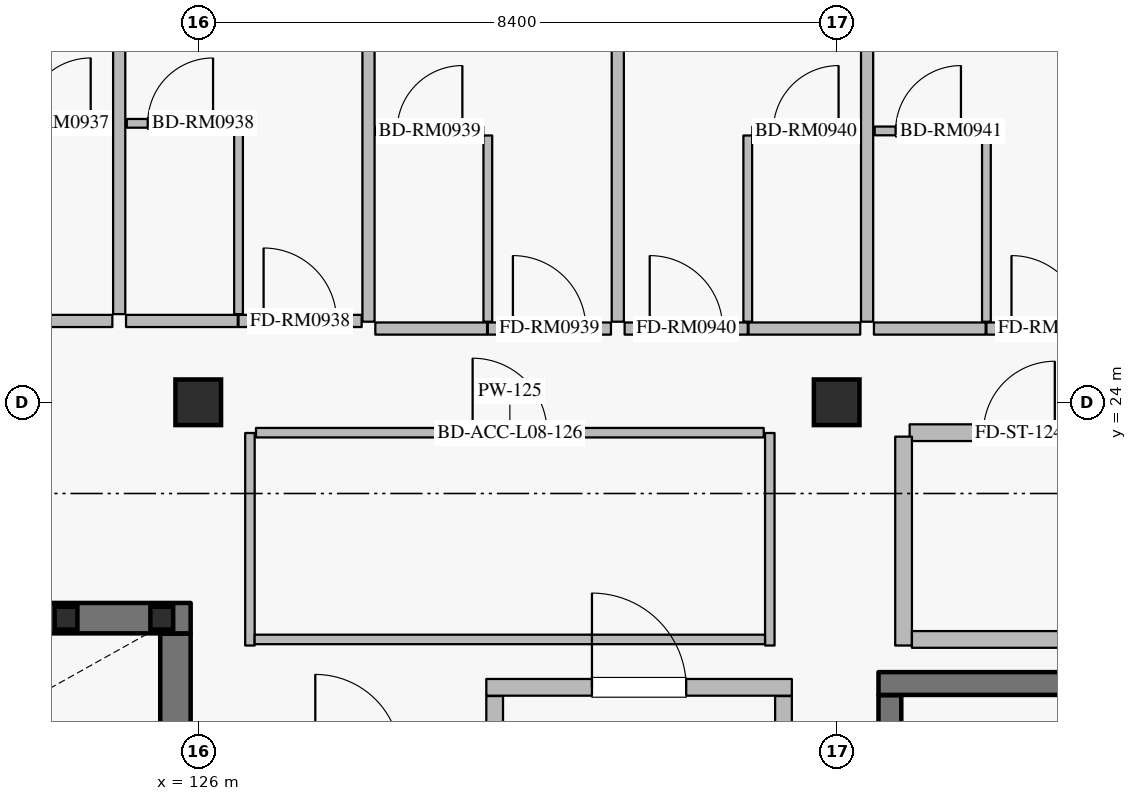
"""IFC4 building model, lengths in metres.
Left out: names, types, materials, properties, quantities, classifications, styles, units other than length and angle.
Written with IfcOpenShell. Run it as: python <this file> out.ifc"""

import sys

from ifc_helpers import new_model, si_unit, direction, frame, frame_2d, origin, origin_2d, place, context, subcontext, project, spatial, rectangle, hollow_rectangle, extrude, element, fill, save


model = new_model("IFC4")
c1 = context("Model", 3, precision=1e-05, world=origin(), true_north=direction((0.0, 1.0)))
c2 = subcontext(c1, "Body", "Model", "MODEL_VIEW")
j1 = project(units=[si_unit("LENGTHUNIT", "METRE"), si_unit("PLANEANGLEUNIT", "RADIAN")], contexts=[c1])
p1 = place(None, origin())
s1 = spatial("IfcSite", under=j1, at=p1, CompositionType="ELEMENT")
p2 = place(p1, origin())
s2 = spatial("IfcBuilding", under=s1, at=p2, CompositionType="ELEMENT")
p3 = place(p2, frame((0.0, 0.0, 36.0)))
s3 = spatial("IfcBuildingStorey", under=s2, at=p3, CompositionType="ELEMENT", Elevation=36.0)
for number, where, z_axis, x_axis in (
    (1, (126.0, 24.0, 0.0), (0.0, 0.0, 1.0), (1.0, 0.0, 0.0)),
    (2, (134.4, 24.0, 0.0), (0.0, 0.0, 1.0), (1.0, 0.0, 0.0)),
):
    element("IfcColumn", number, at=place(p3, frame(where, z_axis=z_axis, x_axis=x_axis)), inside=s3, PredefinedType="COLUMN", context=c2, shape_type="SweptSolid", body=[
        extrude(rectangle(XDim=0.6, YDim=0.6, at=origin_2d()), origin(), (0.0, 0.0, 1.0), 3.6),
    ])
p4 = place(p3, frame((138.05, 20.3, 0.0), z_axis=(0.0, 0.0, 1.0), x_axis=(-1.0, 0.0, 0.0)))
e3 = element("IfcWall", 3, at=p4, inside=s3, PredefinedType="SHEAR", context=c2, shape_type="SweptSolid", body=[
    extrude(rectangle(XDim=3.1, YDim=0.3, at=frame_2d((1.55, 0.0))), origin(), (0.0, 0.0, 1.0), 3.365),
])
p5 = place(p3, frame((135.1, 20.145, 0.0), z_axis=(0.0, 0.0, 1.0), x_axis=(0.0, -1.0, 0.0)))
e4 = element("IfcWall", 4, at=p5, inside=s3, PredefinedType="SHEAR", context=c2, shape_type="SweptSolid", body=[
    extrude(rectangle(XDim=2.59, YDim=0.3, at=frame_2d((1.295, 0.0))), origin(), (0.0, 0.0, 1.0), 3.365),
])
p6 = place(p3, frame((129.9, 19.415, 0.0), z_axis=(0.0, 0.0, 1.0), x_axis=(0.0, 1.0, 0.0)))
e5 = element("IfcWall", 5, at=p6, inside=s3, PredefinedType="PARTITIONING", context=c2, shape_type="SweptSolid", body=[
    extrude(rectangle(XDim=0.72, YDim=0.22, at=frame_2d((0.36, 0.0))), origin(), (0.0, 0.0, 1.0), 3.365),
])
p7 = place(p3, frame((133.7, 16.605, 0.0), z_axis=(0.0, 0.0, 1.0), x_axis=(0.0, 1.0, 0.0)))
e6 = element("IfcWall", 6, at=p7, inside=s3, PredefinedType="PARTITIONING", context=c2, shape_type="SweptSolid", body=[
    extrude(rectangle(XDim=3.53, YDim=0.22, at=frame_2d((1.765, 0.0))), origin(), (0.0, 0.0, 1.0), 3.365),
])
p8 = place(p3, frame((129.79, 20.25, 0.0), z_axis=(0.0, 0.0, 1.0), x_axis=(1.0, 0.0, 0.0)))
e7 = element("IfcWall", 7, at=p8, inside=s3, PredefinedType="PARTITIONING", context=c2, shape_type="SweptSolid", body=[
    extrude(rectangle(XDim=4.02, YDim=0.22, at=frame_2d((2.01, 0.0))), origin(), (0.0, 0.0, 1.0), 3.365),
])
p9 = place(p8, frame((1.39, 0.0, 0.0)))
e8 = element("IfcOpeningElement", 8, at=p9, cuts=e7, PredefinedType="OPENING", context=c2, shape_type="SweptSolid", body=[
    extrude(rectangle(XDim=1.24, YDim=2.2, at=frame_2d((0.62, 1.1))), frame((0.0, 0.12, 0.0), z_axis=(0.0, -1.0, 0.0), x_axis=(1.0, 0.0, 0.0)), (0.0, 0.0, 1.0), 0.24),
])
p10 = place(p3, frame((125.7, 17.005, 0.0), z_axis=(0.0, 0.0, 1.0), x_axis=(0.0, 1.0, 0.0)))
e9 = element("IfcWall", 9, at=p10, inside=s3, PredefinedType="SHEAR", context=c2, shape_type="SweptSolid", body=[
    extrude(rectangle(XDim=3.95, YDim=0.4, at=frame_2d((1.975, 0.0))), origin(), (0.0, 0.0, 1.0), 3.365),
])
p11 = place(p3, frame((117.75, 21.16, 0.0), z_axis=(0.0, 0.0, 1.0), x_axis=(1.0, 0.0, 0.0)))
e10 = element("IfcWall", 10, at=p11, inside=s3, PredefinedType="SHEAR", context=c2, shape_type="SweptSolid", body=[
    extrude(rectangle(XDim=8.15, YDim=0.4, at=frame_2d((4.075, 0.0))), origin(), (0.0, 0.0, 1.0), 3.365),
])
p12 = place(p11, frame((0.38, 0.0, 0.0)))
e11 = element("IfcOpeningElement", 11, at=p12, cuts=e10, PredefinedType="OPENING", context=c2, shape_type="SweptSolid", body=[
    extrude(rectangle(XDim=1.16, YDim=2.2, at=frame_2d((0.58, 1.1))), frame((0.0, 0.21, 0.0), z_axis=(0.0, -1.0, 0.0), x_axis=(1.0, 0.0, 0.0)), (0.0, 0.0, 1.0), 0.42),
])
for number, where, z_axis, x_axis in (
    (12, (124.26, 21.16, -1.8), (0.0, 0.0, 1.0), (1.0, 0.0, 0.0)),
    (13, (125.52, 21.16, -1.8), (0.0, 0.0, 1.0), (1.0, 0.0, 0.0)),
):
    element("IfcColumn", number, at=place(p3, frame(where, z_axis=z_axis, x_axis=x_axis)), inside=s3, PredefinedType="COLUMN", context=c2, shape_type="SweptSolid", body=[
        extrude(hollow_rectangle(XDim=0.3, YDim=0.3, WallThickness=0.012, at=origin_2d()), origin(), (0.0, 0.0, 1.0), 3.42),
    ])
p13 = place(p3, frame((123.4, 25.07, 0.0), z_axis=(0.0, 0.0, 1.0), x_axis=(1.0, 0.0, 0.0)))
e14 = element("IfcWall", 14, at=p13, inside=s3, PredefinedType="PARTITIONING", context=c2, shape_type="SweptSolid", body=[
    extrude(rectangle(XDim=1.47, YDim=0.16, at=frame_2d((0.735, 0.0))), origin(), (0.0, 0.0, 1.0), 3.365),
])
p14 = place(p3, frame((123.45, 27.67, 0.0), z_axis=(0.0, 0.0, 1.0), x_axis=(1.0, 0.0, 0.0)))
e15 = element("IfcWall", 15, at=p14, inside=s3, PredefinedType="PARTITIONING", context=c2, shape_type="SweptSolid", body=[
    extrude(rectangle(XDim=1.41, YDim=0.115, at=frame_2d((0.705, 0.0))), origin(), (0.0, 0.0, 1.0), 3.365),
])
p15 = place(p14, frame((0.275, 0.0, 0.0)))
e16 = element("IfcOpeningElement", 16, at=p15, cuts=e15, PredefinedType="OPENING", context=c2, shape_type="SweptSolid", body=[
    extrude(rectangle(XDim=0.86, YDim=2.12, at=frame_2d((0.43, 1.06))), frame((0.0, 0.067, 0.0), z_axis=(0.0, -1.0, 0.0), x_axis=(1.0, 0.0, 0.0)), (0.0, 0.0, 1.0), 0.135),
])
p16 = place(p3, frame((125.05, 25.07, 0.0), z_axis=(0.0, 0.0, 1.0), x_axis=(1.0, 0.0, 0.0)))
e17 = element("IfcWall", 17, at=p16, inside=s3, PredefinedType="PARTITIONING", context=c2, shape_type="SweptSolid", body=[
    extrude(rectangle(XDim=1.47, YDim=0.16, at=frame_2d((0.735, 0.0))), origin(), (0.0, 0.0, 1.0), 3.365),
])
p17 = place(p3, frame((126.53, 25.07, 0.0), z_axis=(0.0, 0.0, 1.0), x_axis=(1.0, 0.0, 0.0)))
e18 = element("IfcWall", 18, at=p17, inside=s3, PredefinedType="PARTITIONING", context=c2, shape_type="SweptSolid", body=[
    extrude(rectangle(XDim=1.62, YDim=0.16, at=frame_2d((0.81, 0.0))), origin(), (0.0, 0.0, 1.0), 3.365),
])
p18 = place(p17, frame((0.33, 0.0, 0.0)))
e19 = element("IfcOpeningElement", 19, at=p18, cuts=e18, PredefinedType="OPENING", context=c2, shape_type="SweptSolid", body=[
    extrude(rectangle(XDim=0.96, YDim=2.2, at=frame_2d((0.48, 1.1))), frame((0.0, 0.09, 0.0), z_axis=(0.0, -1.0, 0.0), x_axis=(1.0, 0.0, 0.0)), (0.0, 0.0, 1.0), 0.18),
])
p19 = place(p3, frame((126.53, 25.16, 0.0), z_axis=(0.0, 0.0, 1.0), x_axis=(0.0, 1.0, 0.0)))
e20 = element("IfcWall", 20, at=p19, inside=s3, PredefinedType="PARTITIONING", context=c2, shape_type="SweptSolid", body=[
    extrude(rectangle(XDim=2.45, YDim=0.115, at=frame_2d((1.225, 0.0))), origin(), (0.0, 0.0, 1.0), 3.365),
])
p20 = place(p3, frame((125.06, 27.67, 0.0), z_axis=(0.0, 0.0, 1.0), x_axis=(1.0, 0.0, 0.0)))
e21 = element("IfcWall", 21, at=p20, inside=s3, PredefinedType="PARTITIONING", context=c2, shape_type="SweptSolid", body=[
    extrude(rectangle(XDim=1.41, YDim=0.115, at=frame_2d((0.705, 0.0))), origin(), (0.0, 0.0, 1.0), 3.365),
])
p21 = place(p20, frame((0.275, 0.0, 0.0)))
e22 = element("IfcOpeningElement", 22, at=p21, cuts=e21, PredefinedType="OPENING", context=c2, shape_type="SweptSolid", body=[
    extrude(rectangle(XDim=0.86, YDim=2.12, at=frame_2d((0.43, 1.06))), frame((0.0, 0.067, 0.0), z_axis=(0.0, -1.0, 0.0), x_axis=(1.0, 0.0, 0.0)), (0.0, 0.0, 1.0), 0.135),
])
p22 = place(p3, frame((124.96, 25.16, 0.0), z_axis=(0.0, 0.0, 1.0), x_axis=(0.0, 1.0, 0.0)))
e23 = element("IfcWall", 23, at=p22, inside=s3, PredefinedType="PARTITIONING", context=c2, shape_type="SweptSolid", body=[
    extrude(rectangle(XDim=6.5, YDim=0.16, at=frame_2d((3.25, 0.0))), origin(), (0.0, 0.0, 1.0), 3.365),
])
p23 = place(p3, frame((128.33, 24.97, 0.0), z_axis=(0.0, 0.0, 1.0), x_axis=(1.0, 0.0, 0.0)))
e24 = element("IfcWall", 24, at=p23, inside=s3, PredefinedType="PARTITIONING", context=c2, shape_type="SweptSolid", body=[
    extrude(rectangle(XDim=1.47, YDim=0.16, at=frame_2d((0.735, 0.0))), origin(), (0.0, 0.0, 1.0), 3.365),
])
p24 = place(p3, frame((129.81, 24.97, 0.0), z_axis=(0.0, 0.0, 1.0), x_axis=(1.0, 0.0, 0.0)))
e25 = element("IfcWall", 25, at=p24, inside=s3, PredefinedType="PARTITIONING", context=c2, shape_type="SweptSolid", body=[
    extrude(rectangle(XDim=1.62, YDim=0.16, at=frame_2d((0.81, 0.0))), origin(), (0.0, 0.0, 1.0), 3.365),
])
p25 = place(p24, frame((0.33, 0.0, 0.0)))
e26 = element("IfcOpeningElement", 26, at=p25, cuts=e25, PredefinedType="OPENING", context=c2, shape_type="SweptSolid", body=[
    extrude(rectangle(XDim=0.96, YDim=2.2, at=frame_2d((0.48, 1.1))), frame((0.0, 0.09, 0.0), z_axis=(0.0, -1.0, 0.0), x_axis=(1.0, 0.0, 0.0)), (0.0, 0.0, 1.0), 0.18),
])
p26 = place(p3, frame((129.81, 25.06, 0.0), z_axis=(0.0, 0.0, 1.0), x_axis=(0.0, 1.0, 0.0)))
e27 = element("IfcWall", 27, at=p26, inside=s3, PredefinedType="PARTITIONING", context=c2, shape_type="SweptSolid", body=[
    extrude(rectangle(XDim=2.45, YDim=0.115, at=frame_2d((1.225, 0.0))), origin(), (0.0, 0.0, 1.0), 3.365),
])
p27 = place(p3, frame((128.34, 27.57, 0.0), z_axis=(0.0, 0.0, 1.0), x_axis=(1.0, 0.0, 0.0)))
e28 = element("IfcWall", 28, at=p27, inside=s3, PredefinedType="PARTITIONING", context=c2, shape_type="SweptSolid", body=[
    extrude(rectangle(XDim=1.41, YDim=0.115, at=frame_2d((0.705, 0.0))), origin(), (0.0, 0.0, 1.0), 3.365),
])
p28 = place(p27, frame((0.275, 0.0, 0.0)))
e29 = element("IfcOpeningElement", 29, at=p28, cuts=e28, PredefinedType="OPENING", context=c2, shape_type="SweptSolid", body=[
    extrude(rectangle(XDim=0.86, YDim=2.12, at=frame_2d((0.43, 1.06))), frame((0.0, 0.067, 0.0), z_axis=(0.0, -1.0, 0.0), x_axis=(1.0, 0.0, 0.0)), (0.0, 0.0, 1.0), 0.135),
])
p29 = place(p3, frame((128.24, 25.06, 0.0), z_axis=(0.0, 0.0, 1.0), x_axis=(0.0, 1.0, 0.0)))
e30 = element("IfcWall", 30, at=p29, inside=s3, PredefinedType="PARTITIONING", context=c2, shape_type="SweptSolid", body=[
    extrude(rectangle(XDim=6.6, YDim=0.16, at=frame_2d((3.3, 0.0))), origin(), (0.0, 0.0, 1.0), 3.365),
])
p30 = place(p3, frame((131.61, 24.97, 0.0), z_axis=(0.0, 0.0, 1.0), x_axis=(1.0, 0.0, 0.0)))
e31 = element("IfcWall", 31, at=p30, inside=s3, PredefinedType="PARTITIONING", context=c2, shape_type="SweptSolid", body=[
    extrude(rectangle(XDim=1.62, YDim=0.16, at=frame_2d((0.81, 0.0))), origin(), (0.0, 0.0, 1.0), 3.365),
])
p31 = place(p30, frame((0.33, 0.0, 0.0)))
e32 = element("IfcOpeningElement", 32, at=p31, cuts=e31, PredefinedType="OPENING", context=c2, shape_type="SweptSolid", body=[
    extrude(rectangle(XDim=0.96, YDim=2.2, at=frame_2d((0.48, 1.1))), frame((0.0, 0.09, 0.0), z_axis=(0.0, -1.0, 0.0), x_axis=(1.0, 0.0, 0.0)), (0.0, 0.0, 1.0), 0.18),
])
p32 = place(p3, frame((133.24, 24.97, 0.0), z_axis=(0.0, 0.0, 1.0), x_axis=(1.0, 0.0, 0.0)))
e33 = element("IfcWall", 33, at=p32, inside=s3, PredefinedType="PARTITIONING", context=c2, shape_type="SweptSolid", body=[
    extrude(rectangle(XDim=1.47, YDim=0.16, at=frame_2d((0.735, 0.0))), origin(), (0.0, 0.0, 1.0), 3.365),
])
p33 = place(p3, frame((133.23, 25.06, 0.0), z_axis=(0.0, 0.0, 1.0), x_axis=(0.0, 1.0, 0.0)))
e34 = element("IfcWall", 34, at=p33, inside=s3, PredefinedType="PARTITIONING", context=c2, shape_type="SweptSolid", body=[
    extrude(rectangle(XDim=2.45, YDim=0.115, at=frame_2d((1.225, 0.0))), origin(), (0.0, 0.0, 1.0), 3.365),
])
p34 = place(p3, frame((133.29, 27.57, 0.0), z_axis=(0.0, 0.0, 1.0), x_axis=(1.0, 0.0, 0.0)))
e35 = element("IfcWall", 35, at=p34, inside=s3, PredefinedType="PARTITIONING", context=c2, shape_type="SweptSolid", body=[
    extrude(rectangle(XDim=1.41, YDim=0.115, at=frame_2d((0.705, 0.0))), origin(), (0.0, 0.0, 1.0), 3.365),
])
p35 = place(p34, frame((0.275, 0.0, 0.0)))
e36 = element("IfcOpeningElement", 36, at=p35, cuts=e35, PredefinedType="OPENING", context=c2, shape_type="SweptSolid", body=[
    extrude(rectangle(XDim=0.86, YDim=2.12, at=frame_2d((0.43, 1.06))), frame((0.0, 0.067, 0.0), z_axis=(0.0, -1.0, 0.0), x_axis=(1.0, 0.0, 0.0)), (0.0, 0.0, 1.0), 0.135),
])
p36 = place(p3, frame((131.52, 25.06, 0.0), z_axis=(0.0, 0.0, 1.0), x_axis=(0.0, 1.0, 0.0)))
e37 = element("IfcWall", 37, at=p36, inside=s3, PredefinedType="PARTITIONING", context=c2, shape_type="SweptSolid", body=[
    extrude(rectangle(XDim=6.6, YDim=0.16, at=frame_2d((3.3, 0.0))), origin(), (0.0, 0.0, 1.0), 3.365),
])
p37 = place(p3, frame((134.89, 24.97, 0.0), z_axis=(0.0, 0.0, 1.0), x_axis=(1.0, 0.0, 0.0)))
e38 = element("IfcWall", 38, at=p37, inside=s3, PredefinedType="PARTITIONING", context=c2, shape_type="SweptSolid", body=[
    extrude(rectangle(XDim=1.47, YDim=0.16, at=frame_2d((0.735, 0.0))), origin(), (0.0, 0.0, 1.0), 3.365),
])
p38 = place(p3, frame((136.37, 24.97, 0.0), z_axis=(0.0, 0.0, 1.0), x_axis=(1.0, 0.0, 0.0)))
e39 = element("IfcWall", 39, at=p38, inside=s3, PredefinedType="PARTITIONING", context=c2, shape_type="SweptSolid", body=[
    extrude(rectangle(XDim=1.62, YDim=0.16, at=frame_2d((0.81, 0.0))), origin(), (0.0, 0.0, 1.0), 3.365),
])
p39 = place(p38, frame((0.33, 0.0, 0.0)))
e40 = element("IfcOpeningElement", 40, at=p39, cuts=e39, PredefinedType="OPENING", context=c2, shape_type="SweptSolid", body=[
    extrude(rectangle(XDim=0.96, YDim=2.2, at=frame_2d((0.48, 1.1))), frame((0.0, 0.09, 0.0), z_axis=(0.0, -1.0, 0.0), x_axis=(1.0, 0.0, 0.0)), (0.0, 0.0, 1.0), 0.18),
])
p40 = place(p3, frame((136.37, 25.06, 0.0), z_axis=(0.0, 0.0, 1.0), x_axis=(0.0, 1.0, 0.0)))
e41 = element("IfcWall", 41, at=p40, inside=s3, PredefinedType="PARTITIONING", context=c2, shape_type="SweptSolid", body=[
    extrude(rectangle(XDim=2.45, YDim=0.115, at=frame_2d((1.225, 0.0))), origin(), (0.0, 0.0, 1.0), 3.365),
])
p41 = place(p3, frame((134.9, 27.57, 0.0), z_axis=(0.0, 0.0, 1.0), x_axis=(1.0, 0.0, 0.0)))
e42 = element("IfcWall", 42, at=p41, inside=s3, PredefinedType="PARTITIONING", context=c2, shape_type="SweptSolid", body=[
    extrude(rectangle(XDim=1.41, YDim=0.115, at=frame_2d((0.705, 0.0))), origin(), (0.0, 0.0, 1.0), 3.365),
])
p42 = place(p41, frame((0.275, 0.0, 0.0)))
e43 = element("IfcOpeningElement", 43, at=p42, cuts=e42, PredefinedType="OPENING", context=c2, shape_type="SweptSolid", body=[
    extrude(rectangle(XDim=0.86, YDim=2.12, at=frame_2d((0.43, 1.06))), frame((0.0, 0.067, 0.0), z_axis=(0.0, -1.0, 0.0), x_axis=(1.0, 0.0, 0.0)), (0.0, 0.0, 1.0), 0.135),
])
p43 = place(p3, frame((134.8, 25.06, 0.0), z_axis=(0.0, 0.0, 1.0), x_axis=(0.0, 1.0, 0.0)))
e44 = element("IfcWall", 44, at=p43, inside=s3, PredefinedType="PARTITIONING", context=c2, shape_type="SweptSolid", body=[
    extrude(rectangle(XDim=6.6, YDim=0.16, at=frame_2d((3.3, 0.0))), origin(), (0.0, 0.0, 1.0), 3.365),
])
p44 = place(p3, frame((135.36, 23.6, 0.0), z_axis=(0.0, 0.0, 1.0), x_axis=(1.0, 0.0, 0.0)))
e45 = element("IfcWall", 45, at=p44, inside=s3, PredefinedType="PARTITIONING", context=c2, shape_type="SweptSolid", body=[
    extrude(rectangle(XDim=2.88, YDim=0.22, at=frame_2d((1.44, 0.0))), origin(), (0.0, 0.0, 1.0), 3.365),
])
p45 = place(p44, frame((0.97, 0.0, 0.0)))
e46 = element("IfcOpeningElement", 46, at=p45, cuts=e45, PredefinedType="OPENING", context=c2, shape_type="SweptSolid", body=[
    extrude(rectangle(XDim=0.94, YDim=2.15, at=frame_2d((0.47, 1.075))), frame((0.0, 0.12, 0.0), z_axis=(0.0, -1.0, 0.0), x_axis=(1.0, 0.0, 0.0)), (0.0, 0.0, 1.0), 0.24),
])
p46 = place(p3, frame((126.76, 23.6, 0.0), z_axis=(0.0, 0.0, 1.0), x_axis=(1.0, 0.0, 0.0)))
e47 = element("IfcWall", 47, at=p46, inside=s3, PredefinedType="PARTITIONING", context=c2, shape_type="SweptSolid", body=[
    extrude(rectangle(XDim=6.68, YDim=0.125, at=frame_2d((3.34, 0.0))), origin(), (0.0, 0.0, 1.0), 3.365),
])
p47 = place(p46, frame((2.85, 0.0, 0.0)))
e48 = element("IfcOpeningElement", 48, at=p47, cuts=e47, PredefinedType="OPENING", context=c2, shape_type="SweptSolid", body=[
    extrude(rectangle(XDim=0.98, YDim=2.15, at=frame_2d((0.49, 1.075))), frame((0.0, 0.073, 0.0), z_axis=(0.0, -1.0, 0.0), x_axis=(1.0, 0.0, 0.0)), (0.0, 0.0, 1.0), 0.145),
])
p48 = place(p3, frame((135.28, 20.8, 0.0), z_axis=(0.0, 0.0, 1.0), x_axis=(0.0, 1.0, 0.0)))
e49 = element("IfcWall", 49, at=p48, inside=s3, PredefinedType="PARTITIONING", context=c2, shape_type="SweptSolid", body=[
    extrude(rectangle(XDim=2.748, YDim=0.22, at=frame_2d((1.374, 0.0))), origin(), (0.0, 0.0, 1.0), 3.365),
])
p49 = place(p3, frame((135.39, 20.88, 0.0), z_axis=(0.0, 0.0, 1.0), x_axis=(1.0, 0.0, 0.0)))
e50 = element("IfcWall", 50, at=p49, inside=s3, PredefinedType="PARTITIONING", context=c2, shape_type="SweptSolid", body=[
    extrude(rectangle(XDim=2.82, YDim=0.22, at=frame_2d((1.41, 0.0))), origin(), (0.0, 0.0, 1.0), 3.365),
])
for number, where, z_axis, x_axis in (
    (51, (126.68, 20.8, 0.0), (0.0, 0.0, 1.0), (0.0, 1.0, 0.0)),
    (52, (133.52, 20.8, 0.0), (0.0, 0.0, 1.0), (0.0, 1.0, 0.0)),
):
    element("IfcWall", number, at=place(p3, frame(where, z_axis=z_axis, x_axis=x_axis)), inside=s3, PredefinedType="PARTITIONING", context=c2, shape_type="SweptSolid", body=[
        extrude(rectangle(XDim=2.796, YDim=0.125, at=frame_2d((1.398, 0.0))), origin(), (0.0, 0.0, 1.0), 3.365),
    ])
p50 = place(p3, frame((126.742, 20.88, 0.0), z_axis=(0.0, 0.0, 1.0), x_axis=(1.0, 0.0, 0.0)))
e53 = element("IfcWall", 53, at=p50, inside=s3, PredefinedType="PARTITIONING", context=c2, shape_type="SweptSolid", body=[
    extrude(rectangle(XDim=6.715, YDim=0.125, at=frame_2d((3.357, 0.0))), origin(), (0.0, 0.0, 1.0), 3.365),
])
p51 = place(p9, origin())
e54 = element("IfcDoor", 54, at=p51, inside=s3, OperationType="SINGLE_SWING_LEFT", PredefinedType="DOOR", context=c2, shape_type="SweptSolid", body=[
    extrude(rectangle(XDim=1.24, YDim=2.2, at=frame_2d((0.62, 1.1))), frame((0.0, 0.025, 0.0), z_axis=(0.0, -1.0, 0.0), x_axis=(1.0, 0.0, 0.0)), (0.0, 0.0, 1.0), 0.05),
])
fill(e8, e54)
p52 = place(p15, origin())
e55 = element("IfcDoor", 55, at=p52, inside=s3, OperationType="SINGLE_SWING_RIGHT", PredefinedType="DOOR", context=c2, shape_type="SweptSolid", body=[
    extrude(rectangle(XDim=0.86, YDim=2.12, at=frame_2d((0.43, 1.06))), frame((0.0, 0.025, 0.0), z_axis=(0.0, -1.0, 0.0), x_axis=(1.0, 0.0, 0.0)), (0.0, 0.0, 1.0), 0.05),
])
fill(e16, e55)
p53 = place(p18, origin())
e56 = element("IfcDoor", 56, at=p53, inside=s3, OperationType="SINGLE_SWING_LEFT", PredefinedType="DOOR", context=c2, shape_type="SweptSolid", body=[
    extrude(rectangle(XDim=0.96, YDim=2.2, at=frame_2d((0.48, 1.1))), frame((0.0, 0.025, 0.0), z_axis=(0.0, -1.0, 0.0), x_axis=(1.0, 0.0, 0.0)), (0.0, 0.0, 1.0), 0.05),
])
fill(e19, e56)
p54 = place(p21, origin())
e57 = element("IfcDoor", 57, at=p54, inside=s3, OperationType="SINGLE_SWING_RIGHT", PredefinedType="DOOR", context=c2, shape_type="SweptSolid", body=[
    extrude(rectangle(XDim=0.86, YDim=2.12, at=frame_2d((0.43, 1.06))), frame((0.0, 0.025, 0.0), z_axis=(0.0, -1.0, 0.0), x_axis=(1.0, 0.0, 0.0)), (0.0, 0.0, 1.0), 0.05),
])
fill(e22, e57)
p55 = place(p25, origin())
e58 = element("IfcDoor", 58, at=p55, inside=s3, OperationType="SINGLE_SWING_LEFT", PredefinedType="DOOR", context=c2, shape_type="SweptSolid", body=[
    extrude(rectangle(XDim=0.96, YDim=2.2, at=frame_2d((0.48, 1.1))), frame((0.0, 0.025, 0.0), z_axis=(0.0, -1.0, 0.0), x_axis=(1.0, 0.0, 0.0)), (0.0, 0.0, 1.0), 0.05),
])
fill(e26, e58)
p56 = place(p28, origin())
e59 = element("IfcDoor", 59, at=p56, inside=s3, OperationType="SINGLE_SWING_RIGHT", PredefinedType="DOOR", context=c2, shape_type="SweptSolid", body=[
    extrude(rectangle(XDim=0.86, YDim=2.12, at=frame_2d((0.43, 1.06))), frame((0.0, 0.025, 0.0), z_axis=(0.0, -1.0, 0.0), x_axis=(1.0, 0.0, 0.0)), (0.0, 0.0, 1.0), 0.05),
])
fill(e29, e59)
p57 = place(p31, origin())
e60 = element("IfcDoor", 60, at=p57, inside=s3, OperationType="SINGLE_SWING_LEFT", PredefinedType="DOOR", context=c2, shape_type="SweptSolid", body=[
    extrude(rectangle(XDim=0.96, YDim=2.2, at=frame_2d((0.48, 1.1))), frame((0.0, 0.025, 0.0), z_axis=(0.0, -1.0, 0.0), x_axis=(1.0, 0.0, 0.0)), (0.0, 0.0, 1.0), 0.05),
])
fill(e32, e60)
p58 = place(p35, origin())
e61 = element("IfcDoor", 61, at=p58, inside=s3, OperationType="SINGLE_SWING_RIGHT", PredefinedType="DOOR", context=c2, shape_type="SweptSolid", body=[
    extrude(rectangle(XDim=0.86, YDim=2.12, at=frame_2d((0.43, 1.06))), frame((0.0, 0.025, 0.0), z_axis=(0.0, -1.0, 0.0), x_axis=(1.0, 0.0, 0.0)), (0.0, 0.0, 1.0), 0.05),
])
fill(e36, e61)
p59 = place(p39, origin())
e62 = element("IfcDoor", 62, at=p59, inside=s3, OperationType="SINGLE_SWING_LEFT", PredefinedType="DOOR", context=c2, shape_type="SweptSolid", body=[
    extrude(rectangle(XDim=0.96, YDim=2.2, at=frame_2d((0.48, 1.1))), frame((0.0, 0.025, 0.0), z_axis=(0.0, -1.0, 0.0), x_axis=(1.0, 0.0, 0.0)), (0.0, 0.0, 1.0), 0.05),
])
fill(e40, e62)
p60 = place(p42, origin())
e63 = element("IfcDoor", 63, at=p60, inside=s3, OperationType="SINGLE_SWING_RIGHT", PredefinedType="DOOR", context=c2, shape_type="SweptSolid", body=[
    extrude(rectangle(XDim=0.86, YDim=2.12, at=frame_2d((0.43, 1.06))), frame((0.0, 0.025, 0.0), z_axis=(0.0, -1.0, 0.0), x_axis=(1.0, 0.0, 0.0)), (0.0, 0.0, 1.0), 0.05),
])
fill(e43, e63)
p61 = place(p45, origin())
e64 = element("IfcDoor", 64, at=p61, inside=s3, OperationType="SINGLE_SWING_RIGHT", PredefinedType="DOOR", context=c2, shape_type="SweptSolid", body=[
    extrude(rectangle(XDim=0.94, YDim=2.15, at=frame_2d((0.47, 1.075))), frame((0.0, 0.025, 0.0), z_axis=(0.0, -1.0, 0.0), x_axis=(1.0, 0.0, 0.0)), (0.0, 0.0, 1.0), 0.05),
])
fill(e46, e64)
p62 = place(p47, origin())
e65 = element("IfcDoor", 65, at=p62, inside=s3, OperationType="SINGLE_SWING_LEFT", PredefinedType="DOOR", context=c2, shape_type="SweptSolid", body=[
    extrude(rectangle(XDim=0.98, YDim=2.15, at=frame_2d((0.49, 1.075))), frame((0.0, 0.025, 0.0), z_axis=(0.0, -1.0, 0.0), x_axis=(1.0, 0.0, 0.0)), (0.0, 0.0, 1.0), 0.05),
])
fill(e48, e65)
save(model, sys.argv[1])
